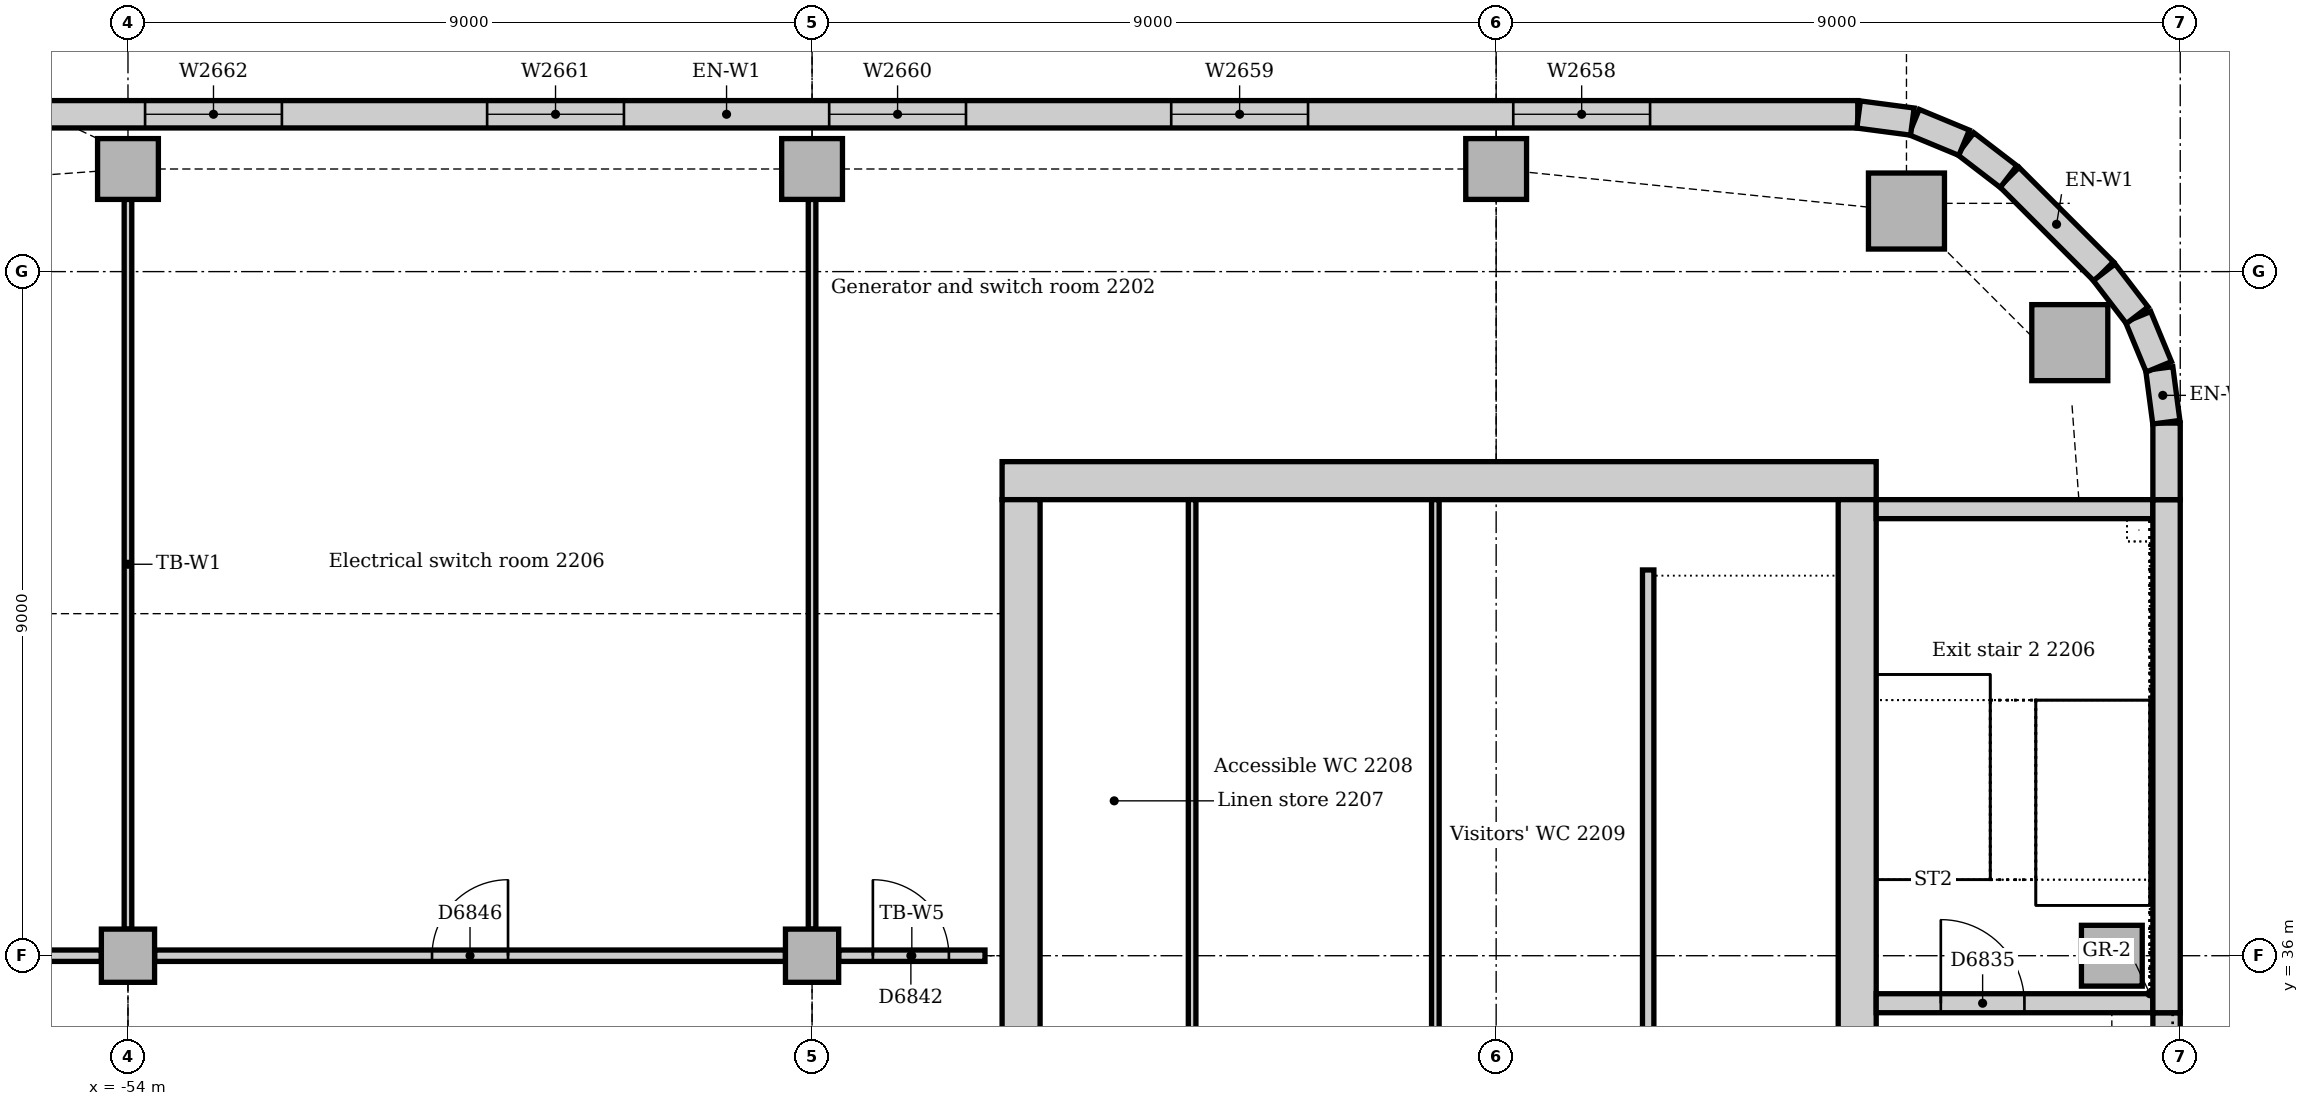
"""IFC4 building model, lengths in metres.
Left out: names, types, materials, properties, quantities, classifications, styles, units other than length and angle.
Written with IfcOpenShell. Run it as: python <this file> out.ifc"""

import sys

from ifc_helpers import new_model, si_unit, direction, frame, frame_2d, origin, origin_2d, place, context, subcontext, project, spatial, rectangle, extrude, element, fill, save


model = new_model("IFC4")
c1 = context("Model", 3, precision=1e-05, world=origin(), true_north=direction((0.0, 1.0)))
c2 = subcontext(c1, "Body", "Model", "MODEL_VIEW")
j1 = project(units=[si_unit("LENGTHUNIT", "METRE"), si_unit("PLANEANGLEUNIT", "RADIAN")], contexts=[c1])
p1 = place(None, origin())
s1 = spatial("IfcSite", under=j1, at=p1, CompositionType="ELEMENT")
p2 = place(p1, origin())
s2 = spatial("IfcBuilding", under=s1, at=p2, CompositionType="ELEMENT")
p3 = place(p2, frame((0.0, 0.0, 95.0)))
s3 = spatial("IfcBuildingStorey", under=s2, at=p3, CompositionType="ELEMENT", Elevation=95.0)
p4 = place(p3, frame((-31.0, 42.25, 0.0), z_axis=(0.0, 0.0, 1.0), x_axis=(-1.0, 0.0, 0.0)))
e1 = element("IfcWall", 1, at=p4, inside=s3, PredefinedType="SOLIDWALL", context=c2, shape_type="SweptSolid", body=[
    extrude(rectangle(XDim=11.5, YDim=0.5, at=frame_2d((5.75, 0.0))), origin(), (0.0, 0.0, 1.0), 5.0),
])
p5 = place(p3, frame((-31.25, 30.5, 0.0), z_axis=(0.0, 0.0, 1.0), x_axis=(0.0, 1.0, 0.0)))
e2 = element("IfcWall", 2, at=p5, inside=s3, PredefinedType="SOLIDWALL", context=c2, shape_type="SweptSolid", body=[
    extrude(rectangle(XDim=11.5, YDim=0.5, at=frame_2d((5.75, 0.0))), origin(), (0.0, 0.0, 1.0), 5.0),
])
p6 = place(p5, frame((0.85, 0.0, 0.0)))
e3 = element("IfcOpeningElement", 3, at=p6, cuts=e2, PredefinedType="OPENING", context=c2, shape_type="SweptSolid", body=[
    extrude(rectangle(XDim=1.8, YDim=2.1, at=frame_2d((0.9, 1.05))), frame((0.0, 0.26, 0.0), z_axis=(0.0, -1.0, 0.0), x_axis=(1.0, 0.0, 0.0)), (0.0, 0.0, 1.0), 0.52),
])
p7 = place(p3, frame((-42.25, 42.0, 0.0), z_axis=(0.0, 0.0, 1.0), x_axis=(0.0, -1.0, 0.0)))
e4 = element("IfcWall", 4, at=p7, inside=s3, PredefinedType="SOLIDWALL", context=c2, shape_type="SweptSolid", body=[
    extrude(rectangle(XDim=11.5, YDim=0.5, at=frame_2d((5.75, 0.0))), origin(), (0.0, 0.0, 1.0), 5.0),
])
p8 = place(p7, frame((8.85, 0.0, 0.0)))
e5 = element("IfcOpeningElement", 5, at=p8, cuts=e4, PredefinedType="OPENING", context=c2, shape_type="SweptSolid", body=[
    extrude(rectangle(XDim=1.8, YDim=2.1, at=frame_2d((0.9, 1.05))), frame((0.0, 0.26, 0.0), z_axis=(0.0, -1.0, 0.0), x_axis=(1.0, 0.0, 0.0)), (0.0, 0.0, 1.0), 0.52),
])
p9 = place(p3, frame((-31.0, 35.375, 0.0), z_axis=(0.0, 0.0, 1.0), x_axis=(1.0, 0.0, 0.0)))
e6 = element("IfcWall", 6, at=p9, inside=s3, PredefinedType="SOLIDWALL", context=c2, shape_type="SweptSolid", body=[
    extrude(rectangle(XDim=3.64, YDim=0.25, at=frame_2d((1.82, 0.0))), origin(), (0.0, 0.0, 1.0), 5.0),
])
p10 = place(p9, frame((0.85, 0.0, 0.0)))
e7 = element("IfcOpeningElement", 7, at=p10, cuts=e6, PredefinedType="OPENING", context=c2, shape_type="SweptSolid", body=[
    extrude(rectangle(XDim=1.1, YDim=2.1, at=frame_2d((0.55, 1.05))), frame((0.0, 0.135, 0.0), z_axis=(0.0, -1.0, 0.0), x_axis=(1.0, 0.0, 0.0)), (0.0, 0.0, 1.0), 0.27),
])
p11 = place(p3, frame((-27.36, 41.875, 0.0), z_axis=(0.0, 0.0, 1.0), x_axis=(-1.0, 0.0, 0.0)))
e8 = element("IfcWall", 8, at=p11, inside=s3, PredefinedType="SOLIDWALL", context=c2, shape_type="SweptSolid", body=[
    extrude(rectangle(XDim=3.64, YDim=0.25, at=frame_2d((1.82, 0.0))), origin(), (0.0, 0.0, 1.0), 5.0),
])
p12 = place(p3, frame((-30.602, 45.797, 0.0), z_axis=(0.0, 0.0, 1.0), x_axis=(1.0, 0.0, 0.0)))
e9 = element("IfcColumn", 9, at=p12, inside=s3, PredefinedType="COLUMN", context=c2, shape_type="SweptSolid", body=[
    extrude(rectangle(XDim=1.0, YDim=1.0, at=origin_2d()), origin(), (0.0, 0.0, 1.0), 4.85),
])
p13 = place(p3, frame((-27.9, 36.0, 0.0), z_axis=(0.0, 0.0, 1.0), x_axis=(1.0, 0.0, 0.0)))
e10 = element("IfcColumn", 10, at=p13, inside=s3, PredefinedType="COLUMN", context=c2, shape_type="SweptSolid", body=[
    extrude(rectangle(XDim=0.8, YDim=0.8, at=origin_2d()), origin(), (0.0, 0.0, 1.0), 5.0),
])
for number, where, z_axis, x_axis in (
    (11, (-54.0, 46.35, 0.0), (0.0, 0.0, 1.0), (1.0, 0.0, 0.0)),
    (12, (-45.0, 46.35, 0.0), (0.0, 0.0, 1.0), (1.0, 0.0, 0.0)),
    (13, (-36.0, 46.35, 0.0), (0.0, 0.0, 1.0), (1.0, 0.0, 0.0)),
):
    element("IfcColumn", number, at=place(p3, frame(where, z_axis=z_axis, x_axis=x_axis)), inside=s3, PredefinedType="COLUMN", context=c2, shape_type="SweptSolid", body=[
        extrude(rectangle(XDim=0.8, YDim=0.8, at=origin_2d()), origin(), (0.0, 0.0, 1.0), 4.85),
    ])
for number, where, z_axis, x_axis in (
    (14, (-54.0, 36.0, 0.0), (0.0, 0.0, 1.0), (1.0, 0.0, 0.0)),
    (15, (-45.0, 36.0, 0.0), (0.0, 0.0, 1.0), (1.0, 0.0, 0.0)),
):
    element("IfcColumn", number, at=place(p3, frame(where, z_axis=z_axis, x_axis=x_axis)), inside=s3, PredefinedType="COLUMN", context=c2, shape_type="SweptSolid", body=[
        extrude(rectangle(XDim=0.7, YDim=0.7, at=origin_2d()), origin(), (0.0, 0.0, 1.0), 4.85),
    ])
p14 = place(p3, frame((-27.18, 27.75, 0.0), z_axis=(0.0, 0.0, 1.0), x_axis=(0.0, 1.0, 0.0)))
e16 = element("IfcWall", 16, at=p14, inside=s3, PredefinedType="STANDARD", context=c2, shape_type="SweptSolid", body=[
    extrude(rectangle(XDim=7.5, YDim=0.36, at=frame_2d((3.75, 0.0))), origin(), (0.0, 0.0, 1.0), 4.85),
])
p15 = place(p14, frame((2.85, 0.0, 1.2)))
e17 = element("IfcOpeningElement", 17, at=p15, cuts=e16, PredefinedType="OPENING", context=c2, shape_type="SweptSolid", body=[
    extrude(rectangle(XDim=1.8, YDim=1.2, at=frame_2d((0.9, 0.6))), frame((0.0, 0.19, 0.0), z_axis=(0.0, -1.0, 0.0), x_axis=(1.0, 0.0, 0.0)), (0.0, 0.0, 1.0), 0.38),
])
p16 = place(p3, frame((-27.18, 35.25, 0.0), z_axis=(0.0, 0.0, 1.0), x_axis=(0.0, 1.0, 0.0)))
e18 = element("IfcWall", 18, at=p16, inside=s3, PredefinedType="STANDARD", context=c2, shape_type="SweptSolid", body=[
    extrude(rectangle(XDim=6.75, YDim=0.36, at=frame_2d((3.375, 0.0))), origin(), (0.0, 0.0, 1.0), 4.85),
])
p17 = place(p3, frame((-27.18, 42.0, 0.0), z_axis=(0.0, 0.0, 1.0), x_axis=(0.0, 1.0, 0.0)))
e19 = element("IfcWall", 19, at=p17, inside=s3, PredefinedType="STANDARD", context=c2, shape_type="SweptSolid", body=[
    extrude(rectangle(XDim=1.007, YDim=0.36, at=frame_2d((0.504, 0.0))), origin(), (0.0, 0.0, 1.0), 4.85),
])
p18 = place(p3, frame((-28.006, 45.001, 0.0), z_axis=(0.0, 0.0, 1.0), x_axis=(-0.707106781187, 0.707106781187, 0.0)))
e20 = element("IfcWall", 20, at=p18, inside=s3, PredefinedType="STANDARD", context=c2, shape_type="SweptSolid", body=[
    extrude(rectangle(XDim=1.757, YDim=0.36, at=frame_2d((0.879, 0.0))), origin(), (0.0, 0.0, 1.0), 3.25),
])
p19 = place(p3, frame((-31.243, 47.07, 0.0), z_axis=(0.0, 0.0, 1.0), x_axis=(-1.0, 0.0, 0.0)))
e21 = element("IfcWall", 21, at=p19, inside=s3, PredefinedType="STANDARD", context=c2, shape_type="SweptSolid", body=[
    extrude(rectangle(XDim=29.765, YDim=0.36, at=frame_2d((14.882, 0.0))), origin(), (0.0, 0.0, 1.0), 3.25),
])
p20 = place(p19, frame((2.732, 0.0, 1.2)))
e22 = element("IfcOpeningElement", 22, at=p20, cuts=e21, PredefinedType="OPENING", context=c2, shape_type="SweptSolid", body=[
    extrude(rectangle(XDim=1.8, YDim=1.2, at=frame_2d((0.9, 0.6))), frame((0.0, 0.19, 0.0), z_axis=(0.0, -1.0, 0.0), x_axis=(1.0, 0.0, 0.0)), (0.0, 0.0, 1.0), 0.38),
])
p21 = place(p19, frame((7.232, 0.0, 1.2)))
e23 = element("IfcOpeningElement", 23, at=p21, cuts=e21, PredefinedType="OPENING", context=c2, shape_type="SweptSolid", body=[
    extrude(rectangle(XDim=1.8, YDim=1.2, at=frame_2d((0.9, 0.6))), frame((0.0, 0.19, 0.0), z_axis=(0.0, -1.0, 0.0), x_axis=(1.0, 0.0, 0.0)), (0.0, 0.0, 1.0), 0.38),
])
p22 = place(p19, frame((11.732, 0.0, 1.2)))
e24 = element("IfcOpeningElement", 24, at=p22, cuts=e21, PredefinedType="OPENING", context=c2, shape_type="SweptSolid", body=[
    extrude(rectangle(XDim=1.8, YDim=1.2, at=frame_2d((0.9, 0.6))), frame((0.0, 0.19, 0.0), z_axis=(0.0, -1.0, 0.0), x_axis=(1.0, 0.0, 0.0)), (0.0, 0.0, 1.0), 0.38),
])
p23 = place(p19, frame((16.232, 0.0, 1.2)))
e25 = element("IfcOpeningElement", 25, at=p23, cuts=e21, PredefinedType="OPENING", context=c2, shape_type="SweptSolid", body=[
    extrude(rectangle(XDim=1.8, YDim=1.2, at=frame_2d((0.9, 0.6))), frame((0.0, 0.19, 0.0), z_axis=(0.0, -1.0, 0.0), x_axis=(1.0, 0.0, 0.0)), (0.0, 0.0, 1.0), 0.38),
])
p24 = place(p19, frame((20.732, 0.0, 1.2)))
e26 = element("IfcOpeningElement", 26, at=p24, cuts=e21, PredefinedType="OPENING", context=c2, shape_type="SweptSolid", body=[
    extrude(rectangle(XDim=1.8, YDim=1.2, at=frame_2d((0.9, 0.6))), frame((0.0, 0.19, 0.0), z_axis=(0.0, -1.0, 0.0), x_axis=(1.0, 0.0, 0.0)), (0.0, 0.0, 1.0), 0.38),
])
p25 = place(p19, frame((25.232, 0.0, 1.2)))
e27 = element("IfcOpeningElement", 27, at=p25, cuts=e21, PredefinedType="OPENING", context=c2, shape_type="SweptSolid", body=[
    extrude(rectangle(XDim=1.8, YDim=1.2, at=frame_2d((0.9, 0.6))), frame((0.0, 0.19, 0.0), z_axis=(0.0, -1.0, 0.0), x_axis=(1.0, 0.0, 0.0)), (0.0, 0.0, 1.0), 0.38),
])
for number, where, z_axis, x_axis in (
    (28, (-27.183, 43.019, 0.0), (0.0, 0.0, 1.0), (-0.131, 0.991, 0.0)),
    (29, (-27.282, 43.747, 0.0), (0.0, 0.0, 1.0), (-0.383, 0.924, 0.0)),
):
    element("IfcWall", number, at=place(p3, frame(where, z_axis=z_axis, x_axis=x_axis)), inside=s3, PredefinedType="STANDARD", context=c2, shape_type="SweptSolid", body=[
        extrude(rectangle(XDim=0.713, YDim=0.36, at=frame_2d((0.356, 0.0))), origin(), (0.0, 0.0, 1.0), 3.25),
    ])
for number, where, z_axis, x_axis in (
    (30, (-27.566, 44.425, 0.0), (0.0, 0.0, 1.0), (-0.609, 0.793, 0.0)),
    (31, (-29.259, 46.25, 0.0), (0.0, 0.0, 1.0), (-0.793, 0.609, 0.0)),
):
    element("IfcWall", number, at=place(p3, frame(where, z_axis=z_axis, x_axis=x_axis)), inside=s3, PredefinedType="STANDARD", context=c2, shape_type="SweptSolid", body=[
        extrude(rectangle(XDim=0.713, YDim=0.36, at=frame_2d((0.357, 0.0))), origin(), (0.0, 0.0, 1.0), 3.25),
    ])
for number, where, z_axis, x_axis in (
    (32, (-29.844, 46.695, 0.0), (0.0, 0.0, 1.0), (-0.924, 0.383, 0.0)),
    (33, (-30.524, 46.974, 0.0), (0.0, 0.0, 1.0), (-0.991, 0.131, 0.0)),
):
    element("IfcWall", number, at=place(p3, frame(where, z_axis=z_axis, x_axis=x_axis)), inside=s3, PredefinedType="STANDARD", context=c2, shape_type="SweptSolid", body=[
        extrude(rectangle(XDim=0.713, YDim=0.36, at=frame_2d((0.356, 0.0))), origin(), (0.0, 0.0, 1.0), 3.25),
    ])
p26 = place(p3, frame((-34.0, 41.075, 0.0), z_axis=(0.0, 0.0, 1.0), x_axis=(0.0, -1.0, 0.0)))
e34 = element("IfcWall", 34, at=p26, inside=s3, PredefinedType="SOLIDWALL", context=c2, shape_type="SweptSolid", body=[
    extrude(rectangle(XDim=7.0, YDim=0.15, at=frame_2d((3.5, 0.0))), origin(), (0.0, 0.0, 1.0), 5.0),
])
for number, where, z_axis, x_axis in (
    (35, (-40.0, 34.075, 0.0), (0.0, 0.0, 1.0), (0.0, 1.0, 0.0)),
    (36, (-36.8, 34.075, 0.0), (0.0, 0.0, 1.0), (0.0, 1.0, 0.0)),
):
    element("IfcWall", number, at=place(p3, frame(where, z_axis=z_axis, x_axis=x_axis)), inside=s3, PredefinedType="PARTITIONING", context=c2, shape_type="SweptSolid", body=[
        extrude(rectangle(XDim=7.925, YDim=0.1, at=frame_2d((3.962, 0.0))), origin(), (0.0, 0.0, 1.0), 4.85),
    ])
p27 = place(p3, frame((-44.65, 36.0, 0.0), z_axis=(0.0, 0.0, 1.0), x_axis=(1.0, 0.0, 0.0)))
e37 = element("IfcWall", 37, at=p27, inside=s3, PredefinedType="PARTITIONING", context=c2, shape_type="SweptSolid", body=[
    extrude(rectangle(XDim=1.925, YDim=0.15, at=frame_2d((0.963, 0.0))), origin(), (0.0, 0.0, 1.0), 4.602),
])
p28 = place(p27, frame((0.45, 0.0, 0.0)))
e38 = element("IfcOpeningElement", 38, at=p28, cuts=e37, PredefinedType="OPENING", context=c2, shape_type="SweptSolid", body=[
    extrude(rectangle(XDim=1.0, YDim=2.1, at=frame_2d((0.5, 1.05))), frame((0.0, 0.085, 0.0), z_axis=(0.0, -1.0, 0.0), x_axis=(1.0, 0.0, 0.0)), (0.0, 0.0, 1.0), 0.17),
])
p29 = place(p3, frame((-53.65, 36.0, 0.0), z_axis=(0.0, 0.0, 1.0), x_axis=(1.0, 0.0, 0.0)))
e39 = element("IfcWall", 39, at=p29, inside=s3, PredefinedType="PARTITIONING", context=c2, shape_type="SweptSolid", body=[
    extrude(rectangle(XDim=8.3, YDim=0.15, at=frame_2d((4.15, 0.0))), origin(), (0.0, 0.0, 1.0), 4.262),
])
p30 = place(p29, frame((3.65, 0.0, 0.0)))
e40 = element("IfcOpeningElement", 40, at=p30, cuts=e39, PredefinedType="OPENING", context=c2, shape_type="SweptSolid", body=[
    extrude(rectangle(XDim=1.0, YDim=2.1, at=frame_2d((0.5, 1.05))), frame((0.0, 0.085, 0.0), z_axis=(0.0, -1.0, 0.0), x_axis=(1.0, 0.0, 0.0)), (0.0, 0.0, 1.0), 0.17),
])
p31 = place(p3, frame((-59.753, 36.0, 0.0), z_axis=(0.0, 0.0, 1.0), x_axis=(1.0, 0.0, 0.0)))
e41 = element("IfcWall", 41, at=p31, inside=s3, PredefinedType="PARTITIONING", context=c2, shape_type="SweptSolid", body=[
    extrude(rectangle(XDim=5.403, YDim=0.15, at=frame_2d((2.701, 0.0))), origin(), (0.0, 0.0, 1.0), 4.35),
])
p32 = place(p31, frame((2.2, 0.0, 0.0)))
e42 = element("IfcOpeningElement", 42, at=p32, cuts=e41, PredefinedType="OPENING", context=c2, shape_type="SweptSolid", body=[
    extrude(rectangle(XDim=1.0, YDim=2.1, at=frame_2d((0.5, 1.05))), frame((0.0, 0.085, 0.0), z_axis=(0.0, -1.0, 0.0), x_axis=(1.0, 0.0, 0.0)), (0.0, 0.0, 1.0), 0.17),
])
for number, where, z_axis, x_axis in (
    (43, (-54.0, 36.35, 0.0), (0.0, 0.0, 1.0), (0.0, 1.0, 0.0)),
    (44, (-45.0, 36.35, 0.0), (0.0, 0.0, 1.0), (0.0, 1.0, 0.0)),
):
    element("IfcWall", number, at=place(p3, frame(where, z_axis=z_axis, x_axis=x_axis)), inside=s3, PredefinedType="PARTITIONING", context=c2, shape_type="SweptSolid", body=[
        extrude(rectangle(XDim=9.6, YDim=0.1, at=frame_2d((4.8, 0.0))), origin(), (0.0, 0.0, 1.0), 4.362),
    ])
p33 = place(p20, origin())
e45 = element("IfcWindow", 45, at=p33, inside=s3, PartitioningType="SINGLE_PANEL", PredefinedType="WINDOW", context=c2, shape_type="SweptSolid", body=[
    extrude(rectangle(XDim=1.8, YDim=1.2, at=frame_2d((0.9, 0.6))), frame((0.0, 0.13, 0.0), z_axis=(0.0, -1.0, 0.0), x_axis=(1.0, 0.0, 0.0)), (0.0, 0.0, 1.0), 0.06),
])
fill(e22, e45)
p34 = place(p21, origin())
e46 = element("IfcWindow", 46, at=p34, inside=s3, PartitioningType="SINGLE_PANEL", PredefinedType="WINDOW", context=c2, shape_type="SweptSolid", body=[
    extrude(rectangle(XDim=1.8, YDim=1.2, at=frame_2d((0.9, 0.6))), frame((0.0, 0.13, 0.0), z_axis=(0.0, -1.0, 0.0), x_axis=(1.0, 0.0, 0.0)), (0.0, 0.0, 1.0), 0.06),
])
fill(e23, e46)
p35 = place(p22, origin())
e47 = element("IfcWindow", 47, at=p35, inside=s3, PartitioningType="SINGLE_PANEL", PredefinedType="WINDOW", context=c2, shape_type="SweptSolid", body=[
    extrude(rectangle(XDim=1.8, YDim=1.2, at=frame_2d((0.9, 0.6))), frame((0.0, 0.13, 0.0), z_axis=(0.0, -1.0, 0.0), x_axis=(1.0, 0.0, 0.0)), (0.0, 0.0, 1.0), 0.06),
])
fill(e24, e47)
p36 = place(p23, origin())
e48 = element("IfcWindow", 48, at=p36, inside=s3, PartitioningType="SINGLE_PANEL", PredefinedType="WINDOW", context=c2, shape_type="SweptSolid", body=[
    extrude(rectangle(XDim=1.8, YDim=1.2, at=frame_2d((0.9, 0.6))), frame((0.0, 0.13, 0.0), z_axis=(0.0, -1.0, 0.0), x_axis=(1.0, 0.0, 0.0)), (0.0, 0.0, 1.0), 0.06),
])
fill(e25, e48)
p37 = place(p24, origin())
e49 = element("IfcWindow", 49, at=p37, inside=s3, PartitioningType="SINGLE_PANEL", PredefinedType="WINDOW", context=c2, shape_type="SweptSolid", body=[
    extrude(rectangle(XDim=1.8, YDim=1.2, at=frame_2d((0.9, 0.6))), frame((0.0, 0.13, 0.0), z_axis=(0.0, -1.0, 0.0), x_axis=(1.0, 0.0, 0.0)), (0.0, 0.0, 1.0), 0.06),
])
fill(e26, e49)
p38 = place(p10, origin())
e50 = element("IfcDoor", 50, at=p38, inside=s3, OperationType="SINGLE_SWING_LEFT", PredefinedType="DOOR", context=c2, shape_type="SweptSolid", body=[
    extrude(rectangle(XDim=1.1, YDim=2.1, at=frame_2d((0.55, 1.05))), frame((0.0, 0.025, 0.0), z_axis=(0.0, -1.0, 0.0), x_axis=(1.0, 0.0, 0.0)), (0.0, 0.0, 1.0), 0.05),
])
fill(e7, e50)
p39 = place(p28, origin())
e51 = element("IfcDoor", 51, at=p39, inside=s3, OperationType="SINGLE_SWING_LEFT", PredefinedType="DOOR", context=c2, shape_type="SweptSolid", body=[
    extrude(rectangle(XDim=1.0, YDim=2.1, at=frame_2d((0.5, 1.05))), frame((0.0, 0.025, 0.0), z_axis=(0.0, -1.0, 0.0), x_axis=(1.0, 0.0, 0.0)), (0.0, 0.0, 1.0), 0.05),
])
fill(e38, e51)
p40 = place(p30, origin())
e52 = element("IfcDoor", 52, at=p40, inside=s3, OperationType="SINGLE_SWING_RIGHT", PredefinedType="DOOR", context=c2, shape_type="SweptSolid", body=[
    extrude(rectangle(XDim=1.0, YDim=2.1, at=frame_2d((0.5, 1.05))), frame((0.0, 0.025, 0.0), z_axis=(0.0, -1.0, 0.0), x_axis=(1.0, 0.0, 0.0)), (0.0, 0.0, 1.0), 0.05),
])
fill(e40, e52)
save(model, sys.argv[1])
